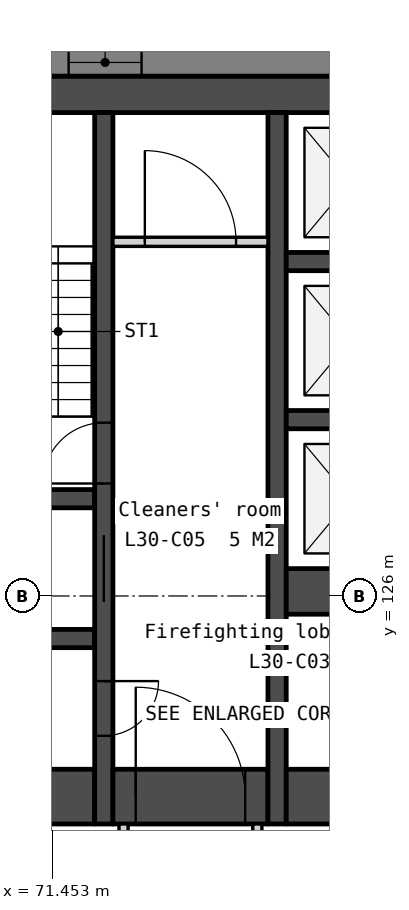
"""IFC4 building model, lengths in metres.
Left out: names, types, materials, properties, quantities, classifications, styles, units other than length and angle.
Written with IfcOpenShell. Run it as: python <this file> out.ifc"""

import sys

from ifc_helpers import new_model, si_unit, direction, frame, frame_2d, origin, place, context, subcontext, project, spatial, polyline, rectangle, outline, extrude, element, fill, save


model = new_model("IFC4")
c1 = context("Model", 3, precision=1e-05, world=origin(), true_north=direction((0.0, 1.0)))
c2 = subcontext(c1, "Body", "Model", "MODEL_VIEW")
j1 = project(units=[si_unit("LENGTHUNIT", "METRE"), si_unit("PLANEANGLEUNIT", "RADIAN")], contexts=[c1])
p1 = place(None, origin())
s1 = spatial("IfcSite", under=j1, at=p1, CompositionType="ELEMENT")
p2 = place(p1, origin())
s2 = spatial("IfcBuilding", under=s1, at=p2, CompositionType="ELEMENT")
p3 = place(p2, frame((0.0, 0.0, 120.3)))
s3 = spatial("IfcBuildingStorey", under=s2, at=p3, CompositionType="ELEMENT", Elevation=120.3)
p4 = place(p3, frame((66.0, 134.25, 0.0), z_axis=(0.0, 0.0, 1.0), x_axis=(1.0, 0.0, 0.0)))
e1 = element("IfcWall", 1, at=p4, inside=s3, PredefinedType="SOLIDWALL", context=c2, shape_type="SweptSolid", body=[
    extrude(rectangle(XDim=28.0, YDim=0.6, at=frame_2d((14.0, 0.0))), origin(), (0.0, 0.0, 1.0), 3.25),
])
for number, where, z_axis, x_axis in (
    (2, (69.6, 127.6, 0.0), (0.0, 0.0, 1.0), (1.0, 0.0, 0.0)),
    (3, (69.6, 125.3, 0.0), (0.0, 0.0, 1.0), (1.0, 0.0, 0.0)),
):
    element("IfcWall", number, at=place(p3, frame(where, z_axis=z_axis, x_axis=x_axis)), inside=s3, PredefinedType="SOLIDWALL", context=c2, shape_type="SweptSolid", body=[
        extrude(rectangle(XDim=2.55, YDim=0.3, at=frame_2d((1.275, 0.0))), origin(), (0.0, 0.0, 1.0), 3.25),
    ])
p5 = place(p3, frame((69.6, 122.7, 0.0), z_axis=(0.0, 0.0, 1.0), x_axis=(1.0, 0.0, 0.0)))
e4 = element("IfcWall", 4, at=p5, inside=s3, PredefinedType="SOLIDWALL", context=c2, shape_type="SweptSolid", body=[
    extrude(rectangle(XDim=2.55, YDim=0.9, at=frame_2d((1.275, 0.0))), origin(), (0.0, 0.0, 1.0), 3.25),
])
p6 = place(p3, frame((72.3, 133.95, 0.0), z_axis=(0.0, 0.0, 1.0), x_axis=(0.0, -1.0, 0.0)))
e5 = element("IfcWall", 5, at=p6, inside=s3, PredefinedType="SOLIDWALL", context=c2, shape_type="SweptSolid", body=[
    extrude(rectangle(XDim=11.7, YDim=0.3, at=frame_2d((5.85, 0.0))), origin(), (0.0, 0.0, 1.0), 3.25),
])
p7 = place(p6, frame((6.95, 0.0, 0.0)))
e6 = element("IfcOpeningElement", 6, at=p7, cuts=e5, PredefinedType="OPENING", context=c2, shape_type="SweptSolid", body=[
    extrude(rectangle(XDim=1.1, YDim=2.1, at=frame_2d((0.55, 1.05))), frame((0.0, 0.16, 0.0), z_axis=(0.0, -1.0, 0.0), x_axis=(1.0, 0.0, 0.0)), (0.0, 0.0, 1.0), 0.32),
])
p8 = place(p6, frame((9.35, 0.0, 0.0)))
e7 = element("IfcOpeningElement", 7, at=p8, cuts=e5, PredefinedType="OPENING", context=c2, shape_type="SweptSolid", body=[
    extrude(rectangle(XDim=0.9, YDim=2.1, at=frame_2d((0.45, 1.05))), frame((0.0, 0.16, 0.0), z_axis=(0.0, -1.0, 0.0), x_axis=(1.0, 0.0, 0.0)), (0.0, 0.0, 1.0), 0.32),
])
p9 = place(p6, frame((5.1, 0.0, 0.0)))
e8 = element("IfcOpeningElement", 8, at=p9, cuts=e5, PredefinedType="OPENING", context=c2, shape_type="SweptSolid", body=[
    extrude(rectangle(XDim=1.0, YDim=2.1, at=frame_2d((0.5, 1.05))), frame((0.0, 0.16, 0.0), z_axis=(0.0, -1.0, 0.0), x_axis=(1.0, 0.0, 0.0)), (0.0, 0.0, 1.0), 0.32),
])
p10 = place(p3, frame((72.45, 131.825, 0.0), z_axis=(0.0, 0.0, 1.0), x_axis=(1.0, 0.0, 0.0)))
e9 = element("IfcWall", 9, at=p10, inside=s3, PredefinedType="PARTITIONING", context=c2, shape_type="SweptSolid", body=[
    extrude(rectangle(XDim=2.55, YDim=0.15, at=frame_2d((1.275, 0.0))), origin(), (0.0, 0.0, 1.0), 3.25),
])
p11 = place(p10, frame((0.525, 0.0, 0.0)))
e10 = element("IfcOpeningElement", 10, at=p11, cuts=e9, PredefinedType="OPENING", context=c2, shape_type="SweptSolid", body=[
    extrude(rectangle(XDim=1.5, YDim=2.1, at=frame_2d((0.75, 1.05))), frame((0.0, 0.085, 0.0), z_axis=(0.0, -1.0, 0.0), x_axis=(1.0, 0.0, 0.0)), (0.0, 0.0, 1.0), 0.17),
])
p12 = place(p3, frame((72.45, 122.7, 0.0), z_axis=(0.0, 0.0, 1.0), x_axis=(1.0, 0.0, 0.0)))
e11 = element("IfcWall", 11, at=p12, inside=s3, PredefinedType="SOLIDWALL", context=c2, shape_type="SweptSolid", body=[
    extrude(rectangle(XDim=2.55, YDim=0.9, at=frame_2d((1.275, 0.0))), origin(), (0.0, 0.0, 1.0), 3.25),
])
p13 = place(p12, frame((0.375, 0.0, 0.0)))
e12 = element("IfcOpeningElement", 12, at=p13, cuts=e11, PredefinedType="OPENING", context=c2, shape_type="SweptSolid", body=[
    extrude(rectangle(XDim=1.8, YDim=2.1, at=frame_2d((0.9, 1.05))), frame((0.0, 0.46, 0.0), z_axis=(0.0, -1.0, 0.0), x_axis=(1.0, 0.0, 0.0)), (0.0, 0.0, 1.0), 0.92),
])
for number, where, z_axis, x_axis in (
    (13, (72.625, 122.25, 0.0), (0.0, 0.0, 1.0), (0.0, -1.0, 0.0)),
    (14, (74.825, 122.25, 0.0), (0.0, 0.0, 1.0), (0.0, -1.0, 0.0)),
):
    element("IfcWall", number, at=place(p3, frame(where, z_axis=z_axis, x_axis=x_axis)), inside=s3, PredefinedType="PARTITIONING", context=c2, shape_type="SweptSolid", body=[
        extrude(rectangle(XDim=2.1, YDim=0.15, at=frame_2d((1.05, 0.0))), origin(), (0.0, 0.0, 1.0), 3.25),
    ])
p14 = place(p3, frame((75.15, 133.95, 0.0), z_axis=(0.0, 0.0, 1.0), x_axis=(0.0, -1.0, 0.0)))
e15 = element("IfcWall", 15, at=p14, inside=s3, PredefinedType="SOLIDWALL", context=c2, shape_type="SweptSolid", body=[
    extrude(rectangle(XDim=11.7, YDim=0.3, at=frame_2d((5.85, 0.0))), origin(), (0.0, 0.0, 1.0), 3.25),
])
for number, where, z_axis, x_axis in (
    (16, (75.3, 131.5, 0.0), (0.0, 0.0, 1.0), (1.0, 0.0, 0.0)),
    (17, (75.3, 128.9, 0.0), (0.0, 0.0, 1.0), (1.0, 0.0, 0.0)),
):
    element("IfcWall", number, at=place(p3, frame(where, z_axis=z_axis, x_axis=x_axis)), inside=s3, PredefinedType="SOLIDWALL", context=c2, shape_type="SweptSolid", body=[
        extrude(rectangle(XDim=2.1, YDim=0.3, at=frame_2d((1.05, 0.0))), origin(), (0.0, 0.0, 1.0), 3.25),
    ])
p15 = place(p3, frame((75.3, 126.075, 0.0), z_axis=(0.0, 0.0, 1.0), x_axis=(1.0, 0.0, 0.0)))
e18 = element("IfcWall", 18, at=p15, inside=s3, PredefinedType="SOLIDWALL", context=c2, shape_type="SweptSolid", body=[
    extrude(rectangle(XDim=2.1, YDim=0.75, at=frame_2d((1.05, 0.0))), origin(), (0.0, 0.0, 1.0), 3.25),
])
p16 = place(p3, frame((75.3, 122.7, 0.0), z_axis=(0.0, 0.0, 1.0), x_axis=(1.0, 0.0, 0.0)))
e19 = element("IfcWall", 19, at=p16, inside=s3, PredefinedType="SOLIDWALL", context=c2, shape_type="SweptSolid", body=[
    extrude(rectangle(XDim=6.2, YDim=0.9, at=frame_2d((3.1, 0.0))), origin(), (0.0, 0.0, 1.0), 3.25),
])
p17 = place(p3, frame((101.322, 134.775, -0.15), z_axis=(0.0, 0.0, 1.0), x_axis=(-1.0, 0.0, 0.0)))
e20 = element("IfcWall", 20, at=p17, inside=s3, PredefinedType="SOLIDWALL", context=c2, shape_type="SweptSolid", body=[
    extrude(outline(polyline([(42.643, 0.0), (42.643, 3.4), (0.0, 3.4), (0.0, 0.0), (42.643, 0.0)])), frame((0.0, 0.225, 0.0), z_axis=(0.0, -1.0, 0.0), x_axis=(1.0, 0.0, 0.0)), (0.0, 0.0, 1.0), 0.45),
])
p18 = place(p17, frame((2.814, 0.0, 1.05)))
e21 = element("IfcOpeningElement", 21, at=p18, cuts=e20, PredefinedType="OPENING", context=c2, shape_type="SweptSolid", body=[
    extrude(rectangle(XDim=1.2, YDim=1.5, at=frame_2d((0.6, 0.75))), frame((0.0, 0.235, 0.0), z_axis=(0.0, -1.0, 0.0), x_axis=(1.0, 0.0, 0.0)), (0.0, 0.0, 1.0), 0.47),
])
p19 = place(p17, frame((4.514, 0.0, 1.05)))
e22 = element("IfcOpeningElement", 22, at=p19, cuts=e20, PredefinedType="OPENING", context=c2, shape_type="SweptSolid", body=[
    extrude(rectangle(XDim=1.2, YDim=1.5, at=frame_2d((0.6, 0.75))), frame((0.0, 0.235, 0.0), z_axis=(0.0, -1.0, 0.0), x_axis=(1.0, 0.0, 0.0)), (0.0, 0.0, 1.0), 0.47),
])
p20 = place(p17, frame((11.343, 0.0, 1.05)))
e23 = element("IfcOpeningElement", 23, at=p20, cuts=e20, PredefinedType="OPENING", context=c2, shape_type="SweptSolid", body=[
    extrude(rectangle(XDim=1.2, YDim=1.5, at=frame_2d((0.6, 0.75))), frame((0.0, 0.235, 0.0), z_axis=(0.0, -1.0, 0.0), x_axis=(1.0, 0.0, 0.0)), (0.0, 0.0, 1.0), 0.47),
])
p21 = place(p17, frame((13.043, 0.0, 1.05)))
e24 = element("IfcOpeningElement", 24, at=p21, cuts=e20, PredefinedType="OPENING", context=c2, shape_type="SweptSolid", body=[
    extrude(rectangle(XDim=1.2, YDim=1.5, at=frame_2d((0.6, 0.75))), frame((0.0, 0.235, 0.0), z_axis=(0.0, -1.0, 0.0), x_axis=(1.0, 0.0, 0.0)), (0.0, 0.0, 1.0), 0.47),
])
p22 = place(p17, frame((19.872, 0.0, 1.05)))
e25 = element("IfcOpeningElement", 25, at=p22, cuts=e20, PredefinedType="OPENING", context=c2, shape_type="SweptSolid", body=[
    extrude(rectangle(XDim=1.2, YDim=1.5, at=frame_2d((0.6, 0.75))), frame((0.0, 0.235, 0.0), z_axis=(0.0, -1.0, 0.0), x_axis=(1.0, 0.0, 0.0)), (0.0, 0.0, 1.0), 0.47),
])
p23 = place(p17, frame((21.572, 0.0, 1.05)))
e26 = element("IfcOpeningElement", 26, at=p23, cuts=e20, PredefinedType="OPENING", context=c2, shape_type="SweptSolid", body=[
    extrude(rectangle(XDim=1.2, YDim=1.5, at=frame_2d((0.6, 0.75))), frame((0.0, 0.235, 0.0), z_axis=(0.0, -1.0, 0.0), x_axis=(1.0, 0.0, 0.0)), (0.0, 0.0, 1.0), 0.47),
])
p24 = place(p17, frame((28.4, 0.0, 1.05)))
e27 = element("IfcOpeningElement", 27, at=p24, cuts=e20, PredefinedType="OPENING", context=c2, shape_type="SweptSolid", body=[
    extrude(rectangle(XDim=1.2, YDim=1.5, at=frame_2d((0.6, 0.75))), frame((0.0, 0.235, 0.0), z_axis=(0.0, -1.0, 0.0), x_axis=(1.0, 0.0, 0.0)), (0.0, 0.0, 1.0), 0.47),
])
p25 = place(p17, frame((30.1, 0.0, 1.05)))
e28 = element("IfcOpeningElement", 28, at=p25, cuts=e20, PredefinedType="OPENING", context=c2, shape_type="SweptSolid", body=[
    extrude(rectangle(XDim=1.2, YDim=1.5, at=frame_2d((0.6, 0.75))), frame((0.0, 0.235, 0.0), z_axis=(0.0, -1.0, 0.0), x_axis=(1.0, 0.0, 0.0)), (0.0, 0.0, 1.0), 0.47),
])
p26 = place(p17, frame((36.929, 0.0, 1.05)))
e29 = element("IfcOpeningElement", 29, at=p26, cuts=e20, PredefinedType="OPENING", context=c2, shape_type="SweptSolid", body=[
    extrude(rectangle(XDim=1.2, YDim=1.5, at=frame_2d((0.6, 0.75))), frame((0.0, 0.235, 0.0), z_axis=(0.0, -1.0, 0.0), x_axis=(1.0, 0.0, 0.0)), (0.0, 0.0, 1.0), 0.47),
])
p27 = place(p17, frame((38.629, 0.0, 1.05)))
e30 = element("IfcOpeningElement", 30, at=p27, cuts=e20, PredefinedType="OPENING", context=c2, shape_type="SweptSolid", body=[
    extrude(rectangle(XDim=1.2, YDim=1.5, at=frame_2d((0.6, 0.75))), frame((0.0, 0.235, 0.0), z_axis=(0.0, -1.0, 0.0), x_axis=(1.0, 0.0, 0.0)), (0.0, 0.0, 1.0), 0.47),
])
p28 = place(p3, frame((56.073, 130.263, -0.15), z_axis=(0.0, 0.0, 1.0), x_axis=(0.500000478905, -0.866025127289, 0.0)))
e31 = element("IfcWall", 31, at=p28, inside=s3, PredefinedType="SOLIDWALL", context=c2, shape_type="SweptSolid", body=[
    extrude(outline(polyline([(42.643, 0.0), (42.643, 3.4), (0.0, 3.4), (0.0, 0.0), (42.643, 0.0)])), frame((0.0, 0.225, 0.0), z_axis=(0.0, -1.0, 0.0), x_axis=(1.0, 0.0, 0.0)), (0.0, 0.0, 1.0), 0.45),
])
p29 = place(p28, frame((2.814, 0.0, 1.05)))
e32 = element("IfcOpeningElement", 32, at=p29, cuts=e31, PredefinedType="OPENING", context=c2, shape_type="SweptSolid", body=[
    extrude(rectangle(XDim=1.2, YDim=1.5, at=frame_2d((0.6, 0.75))), frame((0.0, 0.235, 0.0), z_axis=(0.0, -1.0, 0.0), x_axis=(1.0, 0.0, 0.0)), (0.0, 0.0, 1.0), 0.47),
])
p30 = place(p28, frame((4.514, 0.0, 1.05)))
e33 = element("IfcOpeningElement", 33, at=p30, cuts=e31, PredefinedType="OPENING", context=c2, shape_type="SweptSolid", body=[
    extrude(rectangle(XDim=1.2, YDim=1.5, at=frame_2d((0.6, 0.75))), frame((0.0, 0.235, 0.0), z_axis=(0.0, -1.0, 0.0), x_axis=(1.0, 0.0, 0.0)), (0.0, 0.0, 1.0), 0.47),
])
p31 = place(p28, frame((11.343, 0.0, 1.05)))
e34 = element("IfcOpeningElement", 34, at=p31, cuts=e31, PredefinedType="OPENING", context=c2, shape_type="SweptSolid", body=[
    extrude(rectangle(XDim=1.2, YDim=1.5, at=frame_2d((0.6, 0.75))), frame((0.0, 0.235, 0.0), z_axis=(0.0, -1.0, 0.0), x_axis=(1.0, 0.0, 0.0)), (0.0, 0.0, 1.0), 0.47),
])
p32 = place(p28, frame((13.043, 0.0, 1.05)))
e35 = element("IfcOpeningElement", 35, at=p32, cuts=e31, PredefinedType="OPENING", context=c2, shape_type="SweptSolid", body=[
    extrude(rectangle(XDim=1.2, YDim=1.5, at=frame_2d((0.6, 0.75))), frame((0.0, 0.235, 0.0), z_axis=(0.0, -1.0, 0.0), x_axis=(1.0, 0.0, 0.0)), (0.0, 0.0, 1.0), 0.47),
])
p33 = place(p28, frame((19.872, 0.0, 1.05)))
e36 = element("IfcOpeningElement", 36, at=p33, cuts=e31, PredefinedType="OPENING", context=c2, shape_type="SweptSolid", body=[
    extrude(rectangle(XDim=1.2, YDim=1.5, at=frame_2d((0.6, 0.75))), frame((0.0, 0.235, 0.0), z_axis=(0.0, -1.0, 0.0), x_axis=(1.0, 0.0, 0.0)), (0.0, 0.0, 1.0), 0.47),
])
p34 = place(p28, frame((21.572, 0.0, 1.05)))
e37 = element("IfcOpeningElement", 37, at=p34, cuts=e31, PredefinedType="OPENING", context=c2, shape_type="SweptSolid", body=[
    extrude(rectangle(XDim=1.2, YDim=1.5, at=frame_2d((0.6, 0.75))), frame((0.0, 0.235, 0.0), z_axis=(0.0, -1.0, 0.0), x_axis=(1.0, 0.0, 0.0)), (0.0, 0.0, 1.0), 0.47),
])
p35 = place(p28, frame((28.4, 0.0, 1.05)))
e38 = element("IfcOpeningElement", 38, at=p35, cuts=e31, PredefinedType="OPENING", context=c2, shape_type="SweptSolid", body=[
    extrude(rectangle(XDim=1.2, YDim=1.5, at=frame_2d((0.6, 0.75))), frame((0.0, 0.235, 0.0), z_axis=(0.0, -1.0, 0.0), x_axis=(1.0, 0.0, 0.0)), (0.0, 0.0, 1.0), 0.47),
])
p36 = place(p28, frame((30.1, 0.0, 1.05)))
e39 = element("IfcOpeningElement", 39, at=p36, cuts=e31, PredefinedType="OPENING", context=c2, shape_type="SweptSolid", body=[
    extrude(rectangle(XDim=1.2, YDim=1.5, at=frame_2d((0.6, 0.75))), frame((0.0, 0.235, 0.0), z_axis=(0.0, -1.0, 0.0), x_axis=(1.0, 0.0, 0.0)), (0.0, 0.0, 1.0), 0.47),
])
p37 = place(p28, frame((36.929, 0.0, 1.05)))
e40 = element("IfcOpeningElement", 40, at=p37, cuts=e31, PredefinedType="OPENING", context=c2, shape_type="SweptSolid", body=[
    extrude(rectangle(XDim=1.2, YDim=1.5, at=frame_2d((0.6, 0.75))), frame((0.0, 0.235, 0.0), z_axis=(0.0, -1.0, 0.0), x_axis=(1.0, 0.0, 0.0)), (0.0, 0.0, 1.0), 0.47),
])
p38 = place(p28, frame((38.629, 0.0, 1.05)))
e41 = element("IfcOpeningElement", 41, at=p38, cuts=e31, PredefinedType="OPENING", context=c2, shape_type="SweptSolid", body=[
    extrude(rectangle(XDim=1.2, YDim=1.5, at=frame_2d((0.6, 0.75))), frame((0.0, 0.235, 0.0), z_axis=(0.0, -1.0, 0.0), x_axis=(1.0, 0.0, 0.0)), (0.0, 0.0, 1.0), 0.47),
])
p39 = place(p7, origin())
e42 = element("IfcDoor", 42, at=p39, inside=s3, OperationType="SLIDING_TO_LEFT", PredefinedType="DOOR", context=c2, shape_type="SweptSolid", body=[
    extrude(rectangle(XDim=1.1, YDim=2.1, at=frame_2d((0.55, 1.05))), frame((0.0, 0.025, 0.0), z_axis=(0.0, -1.0, 0.0), x_axis=(1.0, 0.0, 0.0)), (0.0, 0.0, 1.0), 0.05),
])
fill(e6, e42)
p40 = place(p13, origin())
e43 = element("IfcDoor", 43, at=p40, inside=s3, OperationType="DOUBLE_DOOR_DOUBLE_SWING", PredefinedType="DOOR", context=c2, shape_type="SweptSolid", body=[
    extrude(rectangle(XDim=1.8, YDim=2.1, at=frame_2d((0.9, 1.05))), frame((0.0, 0.025, 0.0), z_axis=(0.0, -1.0, 0.0), x_axis=(1.0, 0.0, 0.0)), (0.0, 0.0, 1.0), 0.05),
])
fill(e12, e43)
p41 = place(p11, origin())
e44 = element("IfcDoor", 44, at=p41, inside=s3, OperationType="DOUBLE_DOOR_DOUBLE_SWING", PredefinedType="DOOR", context=c2, shape_type="SweptSolid", body=[
    extrude(rectangle(XDim=1.5, YDim=2.1, at=frame_2d((0.75, 1.05))), frame((0.0, 0.025, 0.0), z_axis=(0.0, -1.0, 0.0), x_axis=(1.0, 0.0, 0.0)), (0.0, 0.0, 1.0), 0.05),
])
fill(e10, e44)
p42 = place(p8, origin())
e45 = element("IfcDoor", 45, at=p42, inside=s3, OperationType="SINGLE_SWING_LEFT", PredefinedType="DOOR", context=c2, shape_type="SweptSolid", body=[
    extrude(rectangle(XDim=0.9, YDim=2.1, at=frame_2d((0.45, 1.05))), frame((0.0, 0.025, 0.0), z_axis=(0.0, -1.0, 0.0), x_axis=(1.0, 0.0, 0.0)), (0.0, 0.0, 1.0), 0.05),
])
fill(e7, e45)
p43 = place(p9, origin())
e46 = element("IfcDoor", 46, at=p43, inside=s3, OperationType="SINGLE_SWING_RIGHT", PredefinedType="DOOR", context=c2, shape_type="SweptSolid", body=[
    extrude(rectangle(XDim=1.0, YDim=2.1, at=frame_2d((0.5, 1.05))), frame((0.0, 0.025, 0.0), z_axis=(0.0, -1.0, 0.0), x_axis=(1.0, 0.0, 0.0)), (0.0, 0.0, 1.0), 0.05),
])
fill(e8, e46)
p44 = place(p24, origin())
e47 = element("IfcWindow", 47, at=p44, inside=s3, PartitioningType="SINGLE_PANEL", PredefinedType="WINDOW", context=c2, shape_type="SweptSolid", body=[
    extrude(rectangle(XDim=1.2, YDim=1.5, at=frame_2d((0.6, 0.75))), frame((0.0, 0.03, 0.0), z_axis=(0.0, -1.0, 0.0), x_axis=(1.0, 0.0, 0.0)), (0.0, 0.0, 1.0), 0.06),
])
fill(e27, e47)
save(model, sys.argv[1])
